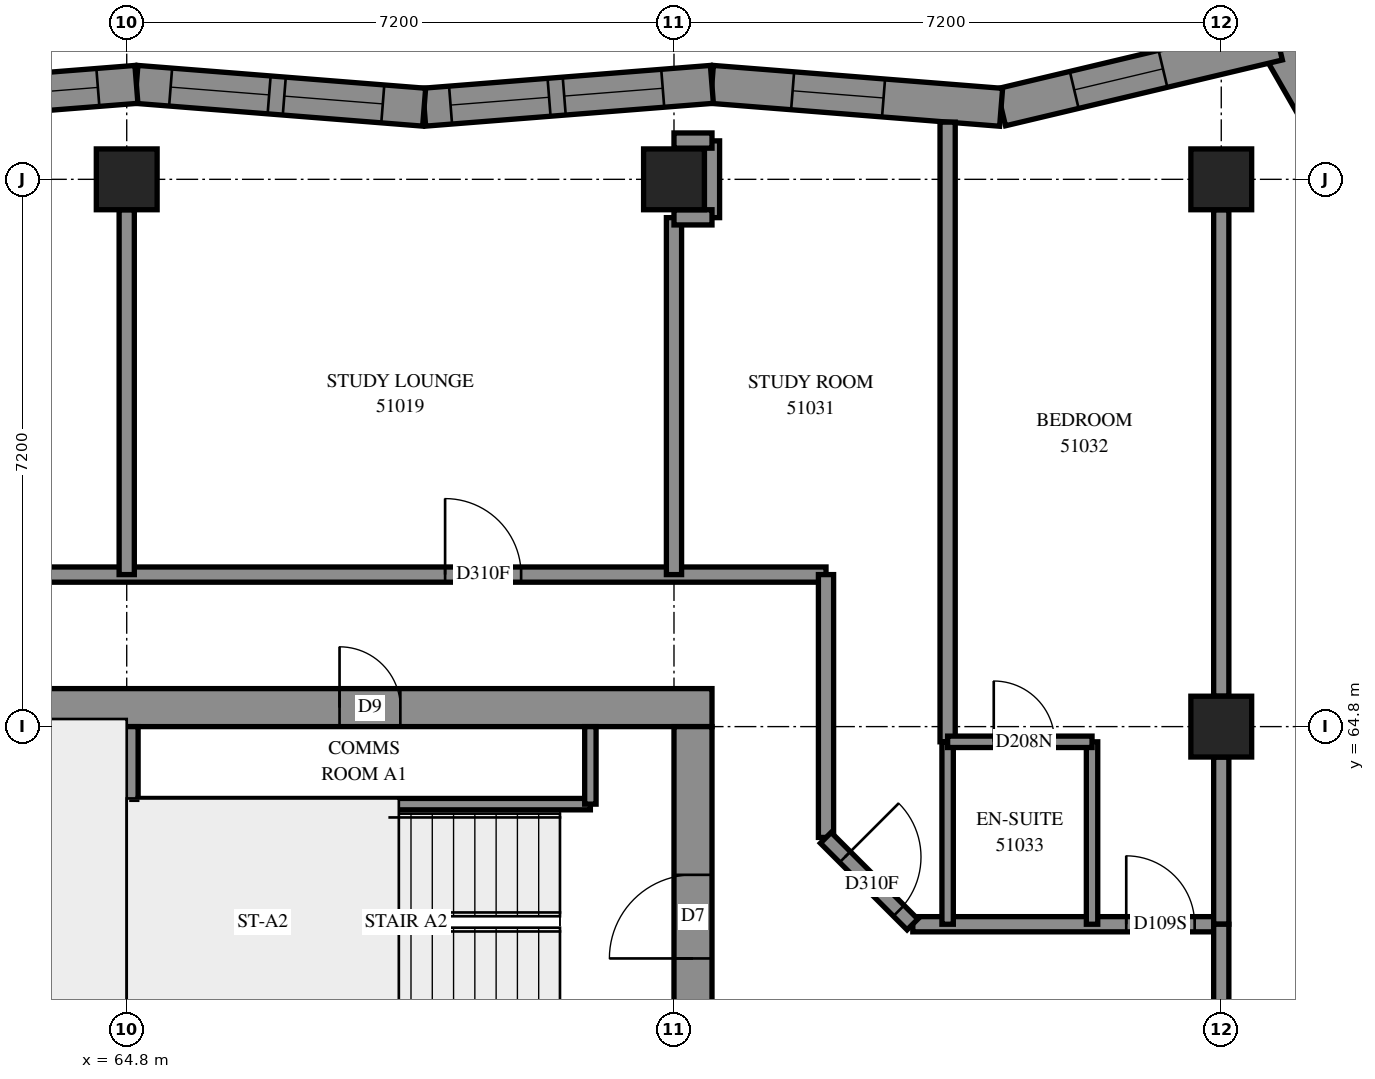
"""IFC4 building model, lengths in metres.
Left out: names, types, materials, properties, quantities, classifications, styles, units other than length and angle.
Written with IfcOpenShell. Run it as: python <this file> out.ifc"""

import sys

from ifc_helpers import new_model, si_unit, direction, frame, frame_2d, origin, origin_2d, place, context, subcontext, project, spatial, polyline, rectangle, outline, extrude, element, fill, save


model = new_model("IFC4")
c1 = context("Model", 3, precision=1e-05, world=origin(), true_north=direction((0.0, 1.0)))
c2 = subcontext(c1, "Body", "Model", "MODEL_VIEW")
j1 = project(units=[si_unit("LENGTHUNIT", "METRE"), si_unit("PLANEANGLEUNIT", "RADIAN")], contexts=[c1])
p1 = place(None, origin())
s1 = spatial("IfcSite", under=j1, at=p1, CompositionType="ELEMENT")
p2 = place(p1, origin())
s2 = spatial("IfcBuilding", under=s1, at=p2, CompositionType="ELEMENT")
p3 = place(p2, frame((0.0, 0.0, 189.6)))
s3 = spatial("IfcBuildingStorey", under=s2, at=p3, CompositionType="ELEMENT", Elevation=189.6)
for number, where, z_axis, x_axis in (
    (1, (64.8, 72.0, 0.0), (0.0, 0.0, 1.0), (1.0, 0.0, 0.0)),
    (2, (72.0, 72.0, 0.0), (0.0, 0.0, 1.0), (1.0, 0.0, 0.0)),
    (3, (79.2, 64.8, 0.0), (0.0, 0.0, 1.0), (1.0, 0.0, 0.0)),
    (4, (79.2, 72.0, 0.0), (0.0, 0.0, 1.0), (1.0, 0.0, 0.0)),
):
    element("IfcColumn", number, at=place(p3, frame(where, z_axis=z_axis, x_axis=x_axis)), inside=s3, PredefinedType="COLUMN", context=c2, shape_type="SweptSolid", body=[
        extrude(rectangle(XDim=0.8, YDim=0.8, at=origin_2d()), origin(), (0.0, 0.0, 1.0), 3.1),
    ])
p4 = place(p3, frame((57.1, 65.05, -0.3), z_axis=(0.0, 0.0, 1.0), x_axis=(1.0, 0.0, 0.0)))
e5 = element("IfcWall", 5, at=p4, inside=s3, PredefinedType="SHEAR", context=c2, shape_type="SweptSolid", body=[
    extrude(rectangle(XDim=15.4, YDim=0.5, at=frame_2d((7.7, 0.0))), origin(), (0.0, 0.0, 1.0), 2.7),
])
p5 = place(p4, frame((10.5, 0.0, 0.3)))
e6 = element("IfcOpeningElement", 6, at=p5, cuts=e5, PredefinedType="OPENING", context=c2, shape_type="SweptSolid", body=[
    extrude(rectangle(XDim=0.8, YDim=2.1, at=frame_2d((0.4, 1.05))), frame((0.0, 0.26, 0.0), z_axis=(0.0, -1.0, 0.0), x_axis=(1.0, 0.0, 0.0)), (0.0, 0.0, 1.0), 0.52),
])
p6 = place(p3, frame((72.25, 50.4, -0.3), z_axis=(0.0, 0.0, 1.0), x_axis=(0.0, 1.0, 0.0)))
e7 = element("IfcWall", 7, at=p6, inside=s3, PredefinedType="SHEAR", context=c2, shape_type="SweptSolid", body=[
    extrude(rectangle(XDim=14.4, YDim=0.5, at=frame_2d((7.2, 0.0))), origin(), (0.0, 0.0, 1.0), 2.7),
])
p7 = place(p6, frame((4.55, 0.0, 0.3)))
e8 = element("IfcOpeningElement", 8, at=p7, cuts=e7, PredefinedType="OPENING", context=c2, shape_type="SweptSolid", body=[
    extrude(rectangle(XDim=1.1, YDim=2.1, at=frame_2d((0.55, 1.05))), frame((0.0, 0.26, 0.0), z_axis=(0.0, -1.0, 0.0), x_axis=(1.0, 0.0, 0.0)), (0.0, 0.0, 1.0), 0.52),
])
p8 = place(p6, frame((11.35, 0.0, 0.3)))
e9 = element("IfcOpeningElement", 9, at=p8, cuts=e7, PredefinedType="OPENING", context=c2, shape_type="SweptSolid", body=[
    extrude(rectangle(XDim=1.1, YDim=2.1, at=frame_2d((0.55, 1.05))), frame((0.0, 0.26, 0.0), z_axis=(0.0, -1.0, 0.0), x_axis=(1.0, 0.0, 0.0)), (0.0, 0.0, 1.0), 0.52),
])
p9 = place(p3, frame((64.8, 60.6, 0.0), z_axis=(0.0, 0.0, 1.0), x_axis=(0.0, 1.0, 0.0)))
e10 = element("IfcWall", 10, at=p9, inside=s3, PredefinedType="SOLIDWALL", context=c2, shape_type="SweptSolid", body=[
    extrude(rectangle(XDim=4.2, YDim=0.3, at=frame_2d((2.1, 0.0))), origin(), (0.0, 0.0, 1.0), 3.1),
])
p10 = place(p3, frame((81.591, 70.948, 0.0), z_axis=(0.0, 0.0, 1.0), x_axis=(-0.4979172531, 0.8672245436, 0.0)))
e11 = element("IfcWall", 11, at=p10, inside=s3, PredefinedType="SOLIDWALL", context=c2, shape_type="SweptSolid", body=[
    extrude(outline(polyline([(0.045, -0.25), (3.491, -0.25), (3.118, 0.25), (-0.045, 0.25), (0.045, -0.25)])), origin(), (0.0, 0.0, 1.0), 3.1),
])
p11 = place(p10, frame((0.761, 0.0, 0.45)))
e12 = element("IfcOpeningElement", 12, at=p11, cuts=e11, PredefinedType="OPENING", context=c2, shape_type="SweptSolid", body=[
    extrude(rectangle(XDim=1.2, YDim=2.5, at=frame_2d((0.6, 1.25))), frame((0.0, 0.26, 0.0), z_axis=(0.0, -1.0, 0.0), x_axis=(1.0, 0.0, 0.0)), (0.0, 0.0, 1.0), 0.52),
])
p12 = place(p3, frame((79.946, 73.814, 0.0), z_axis=(0.0, 0.0, 1.0), x_axis=(-0.9728852584, -0.2312882918, 0.0)))
e13 = element("IfcWall", 13, at=p12, inside=s3, PredefinedType="SOLIDWALL", context=c2, shape_type="SweptSolid", body=[
    extrude(outline(polyline([(-0.187, -0.25), (3.704, -0.25), (3.783, 0.25), (0.187, 0.25), (-0.187, -0.25)])), origin(), (0.0, 0.0, 1.0), 3.1),
])
p13 = place(p12, frame((1.555, 0.0, 0.45)))
e14 = element("IfcOpeningElement", 14, at=p13, cuts=e13, PredefinedType="OPENING", context=c2, shape_type="SweptSolid", body=[
    extrude(rectangle(XDim=1.2, YDim=2.5, at=frame_2d((0.6, 1.25))), frame((0.0, 0.26, 0.0), z_axis=(0.0, -1.0, 0.0), x_axis=(1.0, 0.0, 0.0)), (0.0, 0.0, 1.0), 0.52),
])
p14 = place(p3, frame((76.304, 72.948, 0.0), z_axis=(0.0, 0.0, 1.0), x_axis=(-0.9968755515, 0.0789881945, 0.0)))
e15 = element("IfcWall", 15, at=p14, inside=s3, PredefinedType="SOLIDWALL", context=c2, shape_type="SweptSolid", body=[
    extrude(outline(polyline([(0.039, -0.25), (3.837, -0.25), (3.797, 0.25), (-0.039, 0.25), (0.039, -0.25)])), origin(), (0.0, 0.0, 1.0), 3.1),
])
p15 = place(p14, frame((1.552, 0.0, 0.45)))
e16 = element("IfcOpeningElement", 16, at=p15, cuts=e15, PredefinedType="OPENING", context=c2, shape_type="SweptSolid", body=[
    extrude(rectangle(XDim=1.2, YDim=2.5, at=frame_2d((0.6, 1.25))), frame((0.0, 0.26, 0.0), z_axis=(0.0, -1.0, 0.0), x_axis=(1.0, 0.0, 0.0)), (0.0, 0.0, 1.0), 0.52),
])
p16 = place(p3, frame((72.499, 73.249, 0.0), z_axis=(0.0, 0.0, 1.0), x_axis=(-0.9968747806, -0.0789979222, 0.0)))
e17 = element("IfcWall", 17, at=p16, inside=s3, PredefinedType="SOLIDWALL", context=c2, shape_type="SweptSolid", body=[
    extrude(outline(polyline([(-0.02, -0.25), (3.778, -0.25), (3.817, 0.25), (0.02, 0.25), (-0.02, -0.25)])), origin(), (0.0, 0.0, 1.0), 3.1),
])
p17 = place(p16, frame((0.649, 0.0, 0.45)))
e18 = element("IfcOpeningElement", 18, at=p17, cuts=e17, PredefinedType="OPENING", context=c2, shape_type="SweptSolid", body=[
    extrude(rectangle(XDim=1.3, YDim=2.5, at=frame_2d((0.65, 1.25))), frame((0.0, 0.26, 0.0), z_axis=(0.0, -1.0, 0.0), x_axis=(1.0, 0.0, 0.0)), (0.0, 0.0, 1.0), 0.52),
])
p18 = place(p16, frame((2.149, 0.0, 0.45)))
e19 = element("IfcOpeningElement", 19, at=p18, cuts=e17, PredefinedType="OPENING", context=c2, shape_type="SweptSolid", body=[
    extrude(rectangle(XDim=1.3, YDim=2.5, at=frame_2d((0.65, 1.25))), frame((0.0, 0.26, 0.0), z_axis=(0.0, -1.0, 0.0), x_axis=(1.0, 0.0, 0.0)), (0.0, 0.0, 1.0), 0.52),
])
p19 = place(p3, frame((68.713, 72.949, 0.0), z_axis=(0.0, 0.0, 1.0), x_axis=(-0.9968746163, 0.078999996, 0.0)))
e20 = element("IfcWall", 20, at=p19, inside=s3, PredefinedType="SOLIDWALL", context=c2, shape_type="SweptSolid", body=[
    extrude(outline(polyline([(0.02, -0.25), (3.817, -0.25), (3.778, 0.25), (-0.02, 0.25), (0.02, -0.25)])), origin(), (0.0, 0.0, 1.0), 3.1),
])
p20 = place(p19, frame((0.546, 0.0, 0.45)))
e21 = element("IfcOpeningElement", 21, at=p20, cuts=e20, PredefinedType="OPENING", context=c2, shape_type="SweptSolid", body=[
    extrude(rectangle(XDim=1.3, YDim=2.5, at=frame_2d((0.65, 1.25))), frame((0.0, 0.26, 0.0), z_axis=(0.0, -1.0, 0.0), x_axis=(1.0, 0.0, 0.0)), (0.0, 0.0, 1.0), 0.52),
])
p21 = place(p19, frame((2.046, 0.0, 0.45)))
e22 = element("IfcOpeningElement", 22, at=p21, cuts=e20, PredefinedType="OPENING", context=c2, shape_type="SweptSolid", body=[
    extrude(rectangle(XDim=1.3, YDim=2.5, at=frame_2d((0.65, 1.25))), frame((0.0, 0.26, 0.0), z_axis=(0.0, -1.0, 0.0), x_axis=(1.0, 0.0, 0.0)), (0.0, 0.0, 1.0), 0.52),
])
p22 = place(p3, frame((64.927, 73.249, 0.0), z_axis=(0.0, 0.0, 1.0), x_axis=(-0.9968746163, -0.078999996, 0.0)))
e23 = element("IfcWall", 23, at=p22, inside=s3, PredefinedType="SOLIDWALL", context=c2, shape_type="SweptSolid", body=[
    extrude(outline(polyline([(-0.02, -0.25), (3.778, -0.25), (3.817, 0.25), (0.02, 0.25), (-0.02, -0.25)])), origin(), (0.0, 0.0, 1.0), 3.1),
])
p23 = place(p22, frame((0.509, 0.0, 0.45)))
e24 = element("IfcOpeningElement", 24, at=p23, cuts=e23, PredefinedType="OPENING", context=c2, shape_type="SweptSolid", body=[
    extrude(rectangle(XDim=1.3, YDim=2.5, at=frame_2d((0.65, 1.25))), frame((0.0, 0.26, 0.0), z_axis=(0.0, -1.0, 0.0), x_axis=(1.0, 0.0, 0.0)), (0.0, 0.0, 1.0), 0.52),
])
p24 = place(p22, frame((2.009, 0.0, 0.45)))
e25 = element("IfcOpeningElement", 25, at=p24, cuts=e23, PredefinedType="OPENING", context=c2, shape_type="SweptSolid", body=[
    extrude(rectangle(XDim=1.3, YDim=2.5, at=frame_2d((0.65, 1.25))), frame((0.0, 0.26, 0.0), z_axis=(0.0, -1.0, 0.0), x_axis=(1.0, 0.0, 0.0)), (0.0, 0.0, 1.0), 0.52),
])
p25 = place(p3, frame((64.95, 63.78, 0.0), z_axis=(0.0, 0.0, 1.0), x_axis=(1.0, 0.0, 0.0)))
e26 = element("IfcWall", 26, at=p25, inside=s3, PredefinedType="PARTITIONING", context=c2, shape_type="SweptSolid", body=[
    extrude(rectangle(XDim=5.95, YDim=0.15, at=frame_2d((2.975, 0.0))), origin(), (0.0, 0.0, 1.0), 3.1),
])
p26 = place(p3, frame((70.9, 63.78, 0.0), z_axis=(0.0, 0.0, 1.0), x_axis=(0.0, 1.0, 0.0)))
e27 = element("IfcWall", 27, at=p26, inside=s3, PredefinedType="PARTITIONING", context=c2, shape_type="SweptSolid", body=[
    extrude(rectangle(XDim=1.02, YDim=0.15, at=frame_2d((0.51, 0.0))), origin(), (0.0, 0.0, 1.0), 3.1),
])
p27 = place(p3, frame((55.6, 66.8, 0.0), z_axis=(0.0, 0.0, 1.0), x_axis=(1.0, 0.0, 0.0)))
e28 = element("IfcWall", 28, at=p27, inside=s3, PredefinedType="PARTITIONING", context=c2, shape_type="SweptSolid", body=[
    extrude(rectangle(XDim=18.4, YDim=0.2, at=frame_2d((9.2, 0.0))), origin(), (0.0, 0.0, 1.0), 3.1),
])
p28 = place(p27, frame((5.886, 0.0, 0.0)))
e29 = element("IfcOpeningElement", 29, at=p28, cuts=e28, PredefinedType="OPENING", context=c2, shape_type="SweptSolid", body=[
    extrude(rectangle(XDim=1.0, YDim=2.1, at=frame_2d((0.5, 1.05))), frame((0.0, 0.11, 0.0), z_axis=(0.0, -1.0, 0.0), x_axis=(1.0, 0.0, 0.0)), (0.0, 0.0, 1.0), 0.22),
])
p29 = place(p27, frame((13.389, 0.0, 0.0)))
e30 = element("IfcOpeningElement", 30, at=p29, cuts=e28, PredefinedType="OPENING", context=c2, shape_type="SweptSolid", body=[
    extrude(rectangle(XDim=1.0, YDim=2.1, at=frame_2d((0.5, 1.05))), frame((0.0, 0.11, 0.0), z_axis=(0.0, -1.0, 0.0), x_axis=(1.0, 0.0, 0.0)), (0.0, 0.0, 1.0), 0.22),
])
p30 = place(p3, frame((75.6, 64.6, 0.0), z_axis=(0.0, 0.0, 1.0), x_axis=(0.0, 1.0, 0.0)))
e31 = element("IfcWall", 31, at=p30, inside=s3, PredefinedType="PARTITIONING", context=c2, shape_type="SweptSolid", body=[
    extrude(rectangle(XDim=8.153, YDim=0.2, at=frame_2d((4.076, 0.0))), origin(), (0.0, 0.0, 1.0), 3.1),
])
p31 = place(p3, frame((79.2, 65.2, 0.0), z_axis=(0.0, 0.0, 1.0), x_axis=(0.0, 1.0, 0.0)))
e32 = element("IfcWall", 32, at=p31, inside=s3, PredefinedType="PARTITIONING", context=c2, shape_type="SweptSolid", body=[
    extrude(rectangle(XDim=6.4, YDim=0.2, at=frame_2d((3.2, 0.0))), origin(), (0.0, 0.0, 1.0), 3.1),
])
p32 = place(p3, frame((64.8, 66.8, 0.0), z_axis=(0.0, 0.0, 1.0), x_axis=(0.0, 1.0, 0.0)))
e33 = element("IfcWall", 33, at=p32, inside=s3, PredefinedType="PARTITIONING", context=c2, shape_type="SweptSolid", body=[
    extrude(rectangle(XDim=4.8, YDim=0.2, at=frame_2d((2.4, 0.0))), origin(), (0.0, 0.0, 1.0), 3.1),
])
p33 = place(p3, frame((72.0, 66.8, 0.0), z_axis=(0.0, 0.0, 1.0), x_axis=(0.0, 1.0, 0.0)))
e34 = element("IfcWall", 34, at=p33, inside=s3, PredefinedType="PARTITIONING", context=c2, shape_type="SweptSolid", body=[
    extrude(rectangle(XDim=4.696, YDim=0.2, at=frame_2d((2.348, 0.0))), origin(), (0.0, 0.0, 1.0), 3.1),
])
p34 = place(p3, frame((75.142, 62.2, 0.0), z_axis=(0.0, 0.0, 1.0), x_axis=(1.0, 0.0, 0.0)))
e35 = element("IfcWall", 35, at=p34, inside=s3, PredefinedType="PARTITIONING", context=c2, shape_type="SweptSolid", body=[
    extrude(rectangle(XDim=4.058, YDim=0.2, at=frame_2d((2.029, 0.0))), origin(), (0.0, 0.0, 1.0), 3.1),
])
p35 = place(p34, frame((2.808, 0.0, 0.0)))
e36 = element("IfcOpeningElement", 36, at=p35, cuts=e35, PredefinedType="OPENING", context=c2, shape_type="SweptSolid", body=[
    extrude(rectangle(XDim=0.9, YDim=2.1, at=frame_2d((0.45, 1.05))), frame((0.0, 0.11, 0.0), z_axis=(0.0, -1.0, 0.0), x_axis=(1.0, 0.0, 0.0)), (0.0, 0.0, 1.0), 0.22),
])
p36 = place(p3, frame((74.0, 63.342, 0.0), z_axis=(0.0, 0.0, 1.0), x_axis=(0.0, 1.0, 0.0)))
e37 = element("IfcWall", 37, at=p36, inside=s3, PredefinedType="PARTITIONING", context=c2, shape_type="SweptSolid", body=[
    extrude(rectangle(XDim=3.458, YDim=0.2, at=frame_2d((1.729, 0.0))), origin(), (0.0, 0.0, 1.0), 3.1),
])
for number, where, z_axis, x_axis in (
    (38, (75.6, 62.2, 0.0), (0.0, 0.0, 1.0), (0.0, 1.0, 0.0)),
    (39, (77.5, 62.2, 0.0), (0.0, 0.0, 1.0), (0.0, 1.0, 0.0)),
):
    element("IfcWall", number, at=place(p3, frame(where, z_axis=z_axis, x_axis=x_axis)), inside=s3, PredefinedType="PARTITIONING", context=c2, shape_type="SweptSolid", body=[
        extrude(rectangle(XDim=2.4, YDim=0.15, at=frame_2d((1.2, 0.0))), origin(), (0.0, 0.0, 1.0), 3.1),
    ])
p37 = place(p3, frame((79.2, 62.2, 0.0), z_axis=(0.0, 0.0, 1.0), x_axis=(0.0, 1.0, 0.0)))
e40 = element("IfcWall", 40, at=p37, inside=s3, PredefinedType="PARTITIONING", context=c2, shape_type="SweptSolid", body=[
    extrude(rectangle(XDim=2.2, YDim=0.2, at=frame_2d((1.1, 0.0))), origin(), (0.0, 0.0, 1.0), 3.1),
])
p38 = place(p3, frame((79.2, 60.2, 0.0), z_axis=(0.0, 0.0, 1.0), x_axis=(0.0, 1.0, 0.0)))
e41 = element("IfcWall", 41, at=p38, inside=s3, PredefinedType="PARTITIONING", context=c2, shape_type="SweptSolid", body=[
    extrude(rectangle(XDim=2.0, YDim=0.2, at=frame_2d((1.0, 0.0))), origin(), (0.0, 0.0, 1.0), 3.1),
])
p39 = place(p3, frame((75.6, 64.6, 0.0), z_axis=(0.0, 0.0, 1.0), x_axis=(1.0, 0.0, 0.0)))
e42 = element("IfcWall", 42, at=p39, inside=s3, PredefinedType="PARTITIONING", context=c2, shape_type="SweptSolid", body=[
    extrude(rectangle(XDim=1.9, YDim=0.15, at=frame_2d((0.95, 0.0))), origin(), (0.0, 0.0, 1.0), 3.1),
])
p40 = place(p39, frame((0.607, 0.0, 0.0)))
e43 = element("IfcOpeningElement", 43, at=p40, cuts=e42, PredefinedType="OPENING", context=c2, shape_type="SweptSolid", body=[
    extrude(rectangle(XDim=0.8, YDim=2.1, at=frame_2d((0.4, 1.05))), frame((0.0, 0.085, 0.0), z_axis=(0.0, -1.0, 0.0), x_axis=(1.0, 0.0, 0.0)), (0.0, 0.0, 1.0), 0.17),
])
p41 = place(p3, frame((73.997, 63.337, 0.0), z_axis=(0.0, 0.0, 1.0), x_axis=(0.7071067812, -0.7071067812, 0.0)))
e44 = element("IfcWall", 44, at=p41, inside=s3, PredefinedType="PARTITIONING", context=c2, shape_type="SweptSolid", body=[
    extrude(rectangle(XDim=1.612, YDim=0.2, at=frame_2d((0.806, 0.0))), origin(), (0.0, 0.0, 1.0), 3.1),
])
p42 = place(p41, frame((0.357, 0.0, 0.0)))
e45 = element("IfcOpeningElement", 45, at=p42, cuts=e44, PredefinedType="OPENING", context=c2, shape_type="SweptSolid", body=[
    extrude(rectangle(XDim=1.0, YDim=2.1, at=frame_2d((0.5, 1.05))), frame((0.0, 0.11, 0.0), z_axis=(0.0, -1.0, 0.0), x_axis=(1.0, 0.0, 0.0)), (0.0, 0.0, 1.0), 0.22),
])
p43 = place(p3, frame((72.5, 71.496, 0.0), z_axis=(0.0, 0.0, 1.0), x_axis=(0.0, 1.0, 0.0)))
e46 = element("IfcWall", 46, at=p43, inside=s3, PredefinedType="PARTITIONING", context=c2, shape_type="SweptSolid", body=[
    extrude(rectangle(XDim=1.01, YDim=0.2, at=frame_2d((0.505, 0.0))), origin(), (0.0, 0.0, 1.0), 3.1),
])
for number, where, z_axis, x_axis in (
    (47, (72.0, 72.51, 0.0), (0.0, 0.0, 1.0), (1.0, 0.0, 0.0)),
    (48, (72.0, 71.5, 0.0), (0.0, 0.0, 1.0), (1.0, 0.0, 0.0)),
):
    element("IfcWall", number, at=place(p3, frame(where, z_axis=z_axis, x_axis=x_axis)), inside=s3, PredefinedType="PARTITIONING", context=c2, shape_type="SweptSolid", body=[
        extrude(rectangle(XDim=0.5, YDim=0.2, at=frame_2d((0.25, 0.0))), origin(), (0.0, 0.0, 1.0), 3.1),
    ])
p44 = place(p13, origin())
e49 = element("IfcWindow", 49, at=p44, inside=s3, PartitioningType="SINGLE_PANEL", PredefinedType="WINDOW", context=c2, shape_type="SweptSolid", body=[
    extrude(rectangle(XDim=1.2, YDim=2.5, at=frame_2d((0.6, 1.25))), frame((0.0, 0.18, 0.0), z_axis=(0.0, -1.0, 0.0), x_axis=(1.0, 0.0, 0.0)), (0.0, 0.0, 1.0), 0.06),
])
fill(e14, e49)
p45 = place(p15, origin())
e50 = element("IfcWindow", 50, at=p45, inside=s3, PartitioningType="SINGLE_PANEL", PredefinedType="WINDOW", context=c2, shape_type="SweptSolid", body=[
    extrude(rectangle(XDim=1.2, YDim=2.5, at=frame_2d((0.6, 1.25))), frame((0.0, 0.18, 0.0), z_axis=(0.0, -1.0, 0.0), x_axis=(1.0, 0.0, 0.0)), (0.0, 0.0, 1.0), 0.06),
])
fill(e16, e50)
p46 = place(p17, origin())
e51 = element("IfcWindow", 51, at=p46, inside=s3, PartitioningType="SINGLE_PANEL", PredefinedType="WINDOW", context=c2, shape_type="SweptSolid", body=[
    extrude(rectangle(XDim=1.3, YDim=2.5, at=frame_2d((0.65, 1.25))), frame((0.0, 0.18, 0.0), z_axis=(0.0, -1.0, 0.0), x_axis=(1.0, 0.0, 0.0)), (0.0, 0.0, 1.0), 0.06),
])
fill(e18, e51)
p47 = place(p18, origin())
e52 = element("IfcWindow", 52, at=p47, inside=s3, PartitioningType="SINGLE_PANEL", PredefinedType="WINDOW", context=c2, shape_type="SweptSolid", body=[
    extrude(rectangle(XDim=1.3, YDim=2.5, at=frame_2d((0.65, 1.25))), frame((0.0, 0.18, 0.0), z_axis=(0.0, -1.0, 0.0), x_axis=(1.0, 0.0, 0.0)), (0.0, 0.0, 1.0), 0.06),
])
fill(e19, e52)
p48 = place(p20, origin())
e53 = element("IfcWindow", 53, at=p48, inside=s3, PartitioningType="SINGLE_PANEL", PredefinedType="WINDOW", context=c2, shape_type="SweptSolid", body=[
    extrude(rectangle(XDim=1.3, YDim=2.5, at=frame_2d((0.65, 1.25))), frame((0.0, 0.18, 0.0), z_axis=(0.0, -1.0, 0.0), x_axis=(1.0, 0.0, 0.0)), (0.0, 0.0, 1.0), 0.06),
])
fill(e21, e53)
p49 = place(p21, origin())
e54 = element("IfcWindow", 54, at=p49, inside=s3, PartitioningType="SINGLE_PANEL", PredefinedType="WINDOW", context=c2, shape_type="SweptSolid", body=[
    extrude(rectangle(XDim=1.3, YDim=2.5, at=frame_2d((0.65, 1.25))), frame((0.0, 0.18, 0.0), z_axis=(0.0, -1.0, 0.0), x_axis=(1.0, 0.0, 0.0)), (0.0, 0.0, 1.0), 0.06),
])
fill(e22, e54)
p50 = place(p23, origin())
e55 = element("IfcWindow", 55, at=p50, inside=s3, PartitioningType="SINGLE_PANEL", PredefinedType="WINDOW", context=c2, shape_type="SweptSolid", body=[
    extrude(rectangle(XDim=1.3, YDim=2.5, at=frame_2d((0.65, 1.25))), frame((0.0, 0.18, 0.0), z_axis=(0.0, -1.0, 0.0), x_axis=(1.0, 0.0, 0.0)), (0.0, 0.0, 1.0), 0.06),
])
fill(e24, e55)
p51 = place(p5, origin())
e56 = element("IfcDoor", 56, at=p51, inside=s3, OperationType="SINGLE_SWING_RIGHT", PredefinedType="DOOR", context=c2, shape_type="SweptSolid", body=[
    extrude(rectangle(XDim=0.8, YDim=2.1, at=frame_2d((0.4, 1.05))), frame((0.0, 0.025, 0.0), z_axis=(0.0, -1.0, 0.0), x_axis=(1.0, 0.0, 0.0)), (0.0, 0.0, 1.0), 0.05),
])
fill(e6, e56)
p52 = place(p8, origin())
e57 = element("IfcDoor", 57, at=p52, inside=s3, OperationType="SINGLE_SWING_RIGHT", PredefinedType="DOOR", context=c2, shape_type="SweptSolid", body=[
    extrude(rectangle(XDim=1.1, YDim=2.1, at=frame_2d((0.55, 1.05))), frame((0.0, 0.025, 0.0), z_axis=(0.0, -1.0, 0.0), x_axis=(1.0, 0.0, 0.0)), (0.0, 0.0, 1.0), 0.05),
])
fill(e9, e57)
p53 = place(p29, origin())
e58 = element("IfcDoor", 58, at=p53, inside=s3, OperationType="SINGLE_SWING_RIGHT", PredefinedType="DOOR", context=c2, shape_type="SweptSolid", body=[
    extrude(rectangle(XDim=1.0, YDim=2.1, at=frame_2d((0.5, 1.05))), frame((0.0, 0.025, 0.0), z_axis=(0.0, -1.0, 0.0), x_axis=(1.0, 0.0, 0.0)), (0.0, 0.0, 1.0), 0.05),
])
fill(e30, e58)
p54 = place(p42, origin())
e59 = element("IfcDoor", 59, at=p54, inside=s3, OperationType="SINGLE_SWING_RIGHT", PredefinedType="DOOR", context=c2, shape_type="SweptSolid", body=[
    extrude(rectangle(XDim=1.0, YDim=2.1, at=frame_2d((0.5, 1.05))), frame((0.0, 0.025, 0.0), z_axis=(0.0, -1.0, 0.0), x_axis=(1.0, 0.0, 0.0)), (0.0, 0.0, 1.0), 0.05),
])
fill(e45, e59)
p55 = place(p35, origin())
e60 = element("IfcDoor", 60, at=p55, inside=s3, OperationType="SINGLE_SWING_LEFT", PredefinedType="DOOR", context=c2, shape_type="SweptSolid", body=[
    extrude(rectangle(XDim=0.9, YDim=2.1, at=frame_2d((0.45, 1.05))), frame((0.0, 0.025, 0.0), z_axis=(0.0, -1.0, 0.0), x_axis=(1.0, 0.0, 0.0)), (0.0, 0.0, 1.0), 0.05),
])
fill(e36, e60)
p56 = place(p40, origin())
e61 = element("IfcDoor", 61, at=p56, inside=s3, OperationType="SINGLE_SWING_RIGHT", PredefinedType="DOOR", context=c2, shape_type="SweptSolid", body=[
    extrude(rectangle(XDim=0.8, YDim=2.1, at=frame_2d((0.4, 1.05))), frame((0.0, 0.025, 0.0), z_axis=(0.0, -1.0, 0.0), x_axis=(1.0, 0.0, 0.0)), (0.0, 0.0, 1.0), 0.05),
])
fill(e43, e61)
save(model, sys.argv[1])
